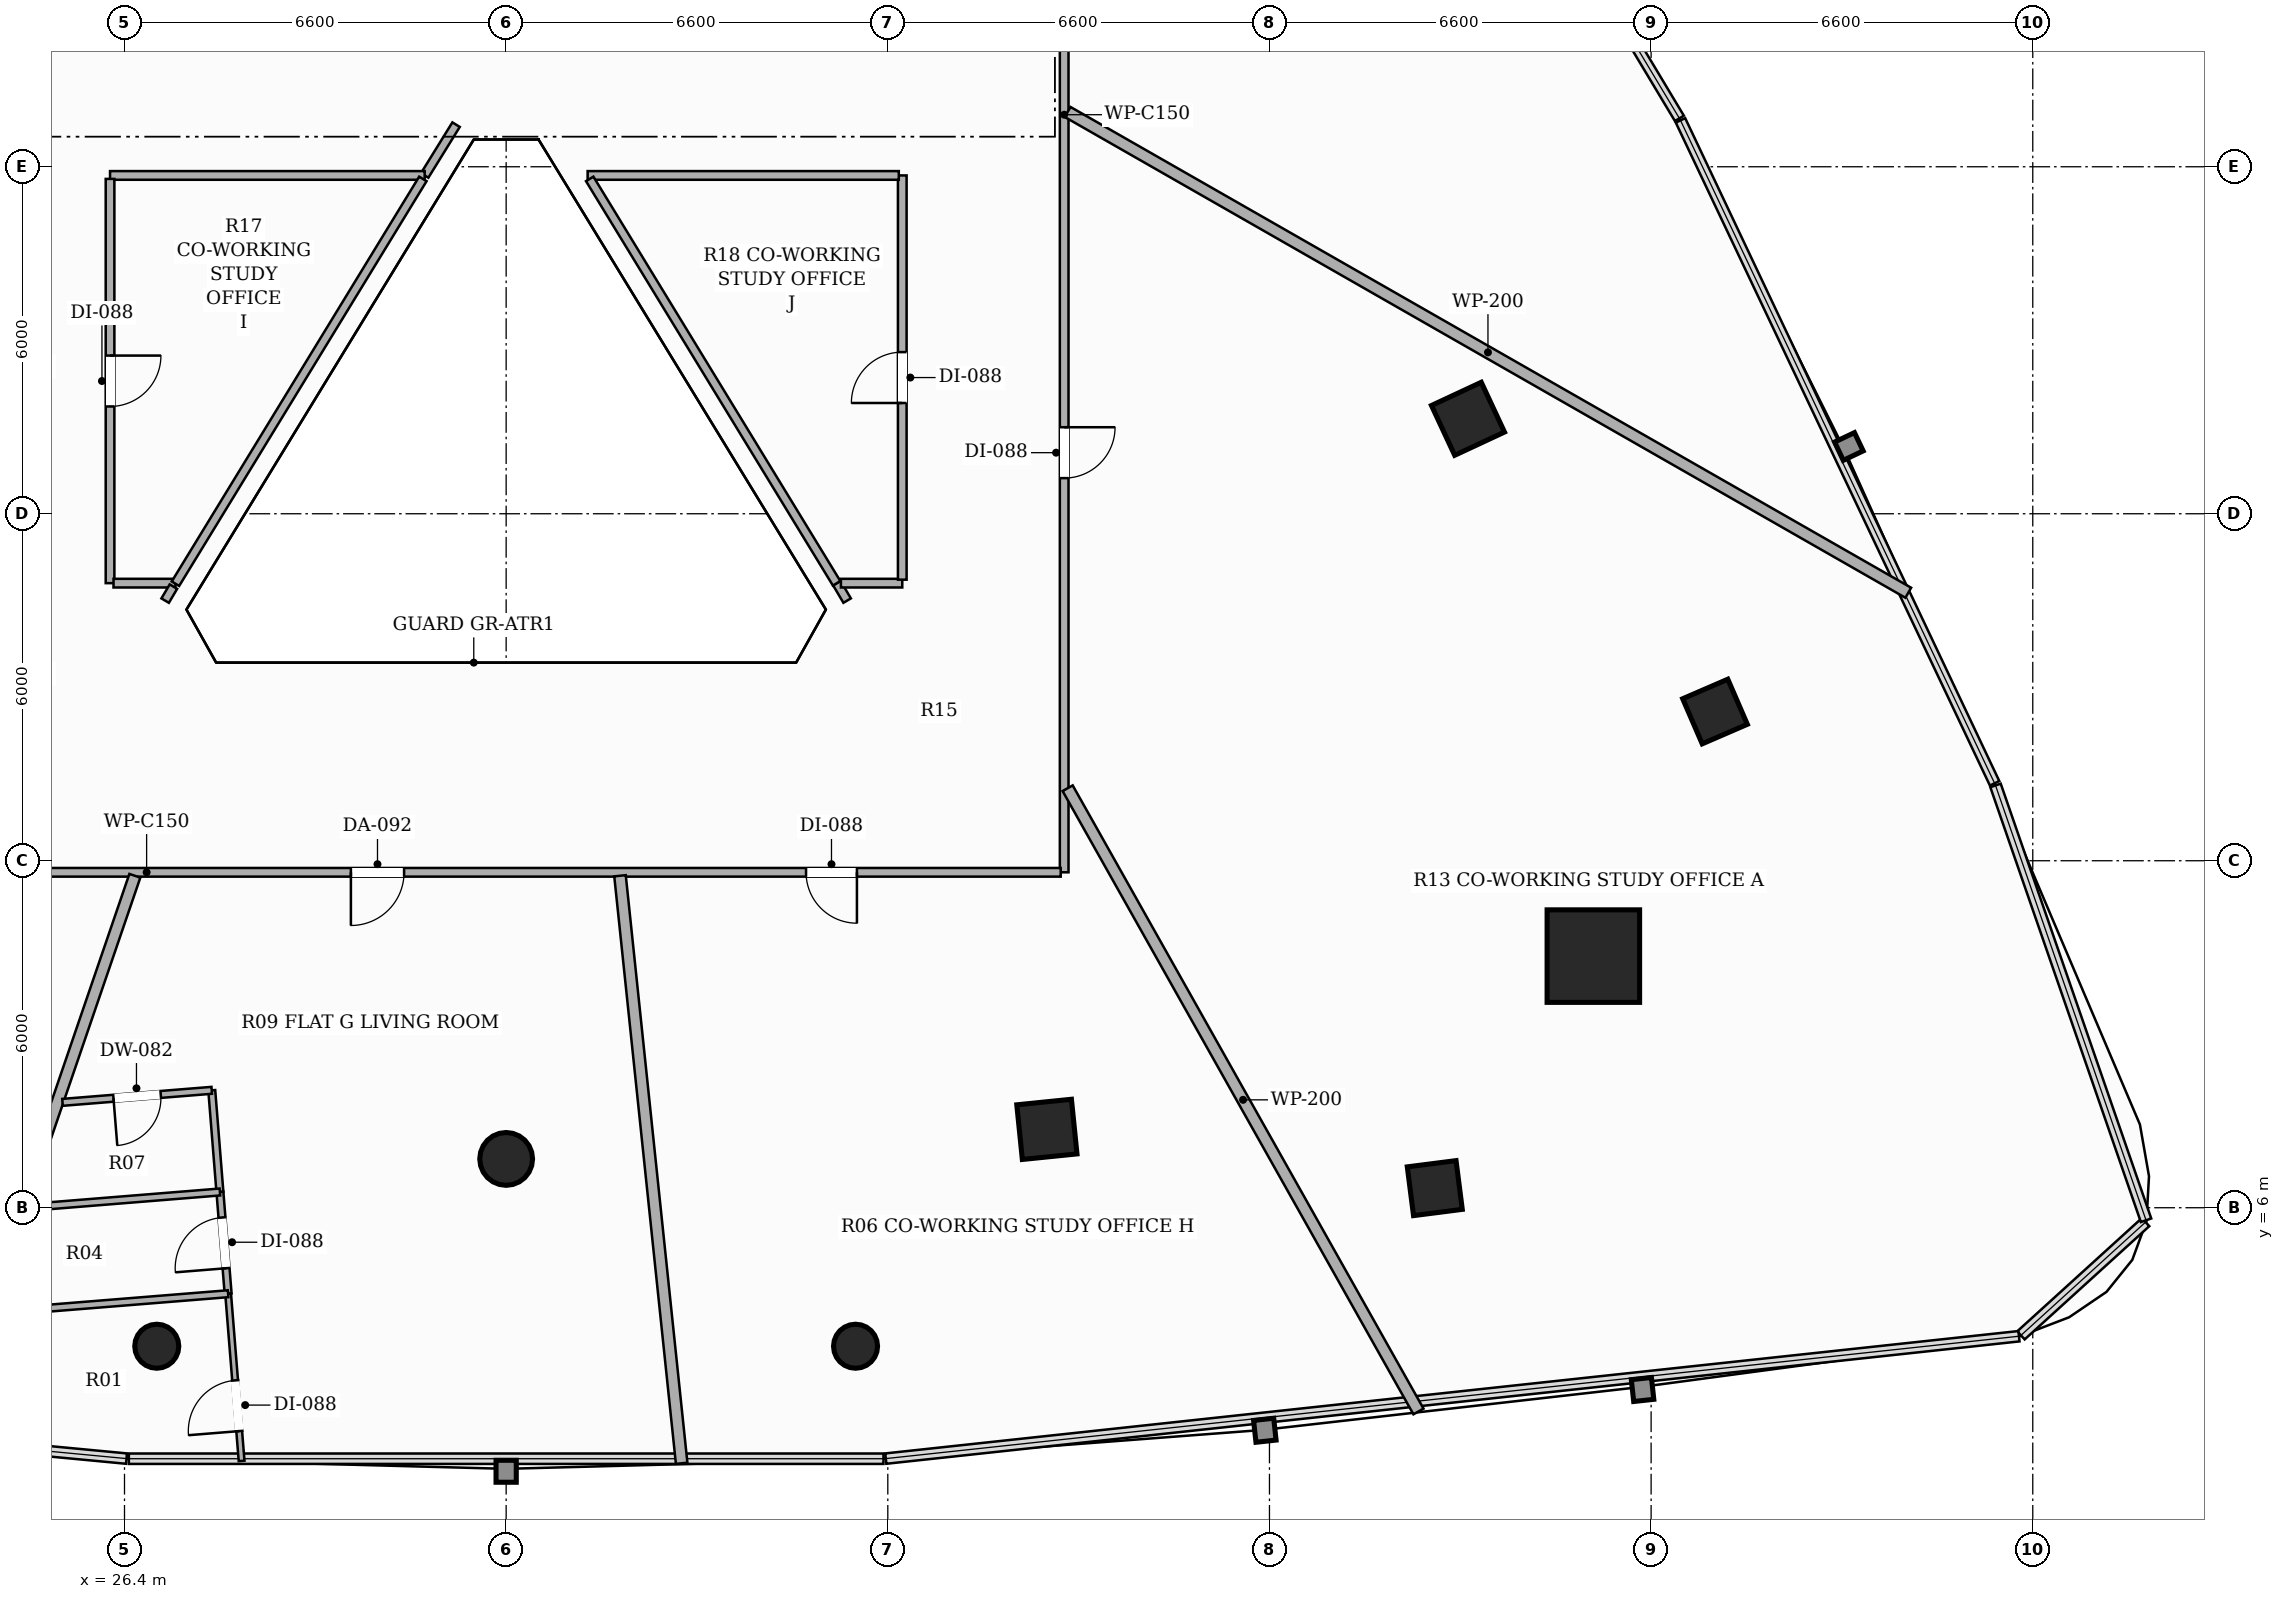
"""IFC4 building model, lengths in metres.
Left out: names, types, materials, properties, quantities, classifications, styles, units other than length and angle.
Written with IfcOpenShell. Run it as: python <this file> out.ifc"""

import sys

from ifc_helpers import new_model, si_unit, direction, frame, frame_2d, origin, origin_2d, place, context, subcontext, project, spatial, rectangle, hollow_rectangle, hollow_circle, extrude, element, fill, save


model = new_model("IFC4")
c1 = context("Model", 3, precision=1e-05, world=origin(), true_north=direction((0.0, 1.0)))
c2 = subcontext(c1, "Body", "Model", "MODEL_VIEW")
j1 = project(units=[si_unit("LENGTHUNIT", "METRE"), si_unit("PLANEANGLEUNIT", "RADIAN")], contexts=[c1])
p1 = place(None, origin())
s1 = spatial("IfcSite", under=j1, at=p1, CompositionType="ELEMENT")
p2 = place(p1, origin())
s2 = spatial("IfcBuilding", under=s1, at=p2, CompositionType="ELEMENT")
p3 = place(p2, frame((0.0, 0.0, 56.6)))
s3 = spatial("IfcBuildingStorey", under=s2, at=p3, CompositionType="ELEMENT", Elevation=56.6)
p4 = place(p3, frame((51.801, 10.351, 0.0), z_axis=(0.0, 0.0, 1.0), x_axis=(1.0, 0.0, 0.0)))
e1 = element("IfcColumn", 1, at=p4, inside=s3, PredefinedType="COLUMN", context=c2, shape_type="SweptSolid", body=[
    extrude(hollow_rectangle(XDim=1.6, YDim=1.6, WallThickness=0.05, at=origin_2d()), origin(), (0.0, 0.0, 1.0), 3.3),
])
p5 = place(p3, frame((33.0, 6.844, 0.0), z_axis=(0.0, 0.0, 1.0), x_axis=(1.0, 0.0, 0.0)))
e2 = element("IfcColumn", 2, at=p5, inside=s3, PredefinedType="COLUMN", context=c2, shape_type="SweptSolid", body=[
    extrude(hollow_circle(Radius=0.457, WallThickness=0.025, at=origin_2d()), origin(), (0.0, 0.0, 1.0), 3.3),
])
for number, where, z_axis, x_axis in (
    (3, (42.351, 7.355, 0.0), (0.0, 0.0, 1.0), (0.995, 0.101, 0.0)),
    (4, (49.633, 19.642, 0.0), (0.0, 0.0, 1.0), (-0.423, 0.906, 0.0)),
):
    element("IfcColumn", number, at=place(p3, frame(where, z_axis=z_axis, x_axis=x_axis)), inside=s3, PredefinedType="COLUMN", context=c2, shape_type="SweptSolid", body=[
        extrude(hollow_rectangle(XDim=0.95, YDim=0.95, WallThickness=0.032, at=origin_2d()), origin(), (0.0, 0.0, 1.0), 3.3),
    ])
for number, where, z_axis, x_axis in (
    (5, (49.059, 6.339, 0.0), (0.0, 0.0, 1.0), (0.992, 0.127, 0.0)),
    (6, (53.905, 14.58, 0.0), (0.0, 0.0, 1.0), (-0.397, 0.918, 0.0)),
):
    element("IfcColumn", number, at=place(p3, frame(where, z_axis=z_axis, x_axis=x_axis)), inside=s3, PredefinedType="COLUMN", context=c2, shape_type="SweptSolid", body=[
        extrude(hollow_rectangle(XDim=0.85, YDim=0.85, WallThickness=0.028, at=origin_2d()), origin(), (0.0, 0.0, 1.0), 3.3),
    ])
for number, where, z_axis, x_axis in (
    (7, (26.958, 3.605, 0.0), (0.0, 0.0, 1.0), (1.0, 0.0, 0.0)),
    (8, (39.042, 3.605, 0.0), (0.0, 0.0, 1.0), (1.0, 0.0, 0.0)),
):
    element("IfcColumn", number, at=place(p3, frame(where, z_axis=z_axis, x_axis=x_axis)), inside=s3, PredefinedType="COLUMN", context=c2, shape_type="SweptSolid", body=[
        extrude(hollow_circle(Radius=0.381, WallThickness=0.022, at=origin_2d()), origin(), (0.0, 0.0, 1.0), 3.3),
    ])
p6 = place(p3, frame((42.65, 36.84, 0.0), z_axis=(0.0, 0.0, 1.0), x_axis=(0.0, -1.0, 0.0)))
e9 = element("IfcWall", 9, at=p6, inside=s3, PredefinedType="PARTITIONING", context=c2, shape_type="SweptSolid", body=[
    extrude(rectangle(XDim=25.04, YDim=0.15, at=frame_2d((12.52, 0.0))), origin(), (0.0, 0.0, 1.0), 2.373),
])
p7 = place(p6, frame((17.344, 0.0, 0.0)))
e10 = element("IfcOpeningElement", 10, at=p7, cuts=e9, PredefinedType="OPENING", context=c2, shape_type="SweptSolid", body=[
    extrude(rectangle(XDim=0.88, YDim=2.1, at=frame_2d((0.44, 1.05))), frame((0.0, 0.085, 0.0), z_axis=(0.0, -1.0, 0.0), x_axis=(1.0, 0.0, 0.0)), (0.0, 0.0, 1.0), 0.17),
])
p8 = place(p6, frame((5.656, 0.0, 0.0)))
e11 = element("IfcOpeningElement", 11, at=p8, cuts=e9, PredefinedType="OPENING", context=c2, shape_type="SweptSolid", body=[
    extrude(rectangle(XDim=0.88, YDim=2.1, at=frame_2d((0.44, 1.05))), frame((0.0, 0.085, 0.0), z_axis=(0.0, -1.0, 0.0), x_axis=(1.0, 0.0, 0.0)), (0.0, 0.0, 1.0), 0.17),
])
p9 = place(p3, frame((42.59, 11.8, 0.0), z_axis=(0.0, 0.0, 1.0), x_axis=(-1.0, 0.0, 0.0)))
e12 = element("IfcWall", 12, at=p9, inside=s3, PredefinedType="PARTITIONING", context=c2, shape_type="SweptSolid", body=[
    extrude(rectangle(XDim=19.24, YDim=0.15, at=frame_2d((9.62, 0.0))), origin(), (0.0, 0.0, 1.0), 2.629),
])
p10 = place(p9, frame((11.355, 0.0, 0.0)))
e13 = element("IfcOpeningElement", 13, at=p10, cuts=e12, PredefinedType="OPENING", context=c2, shape_type="SweptSolid", body=[
    extrude(rectangle(XDim=0.92, YDim=2.15, at=frame_2d((0.46, 1.075))), frame((0.0, 0.085, 0.0), z_axis=(0.0, -1.0, 0.0), x_axis=(1.0, 0.0, 0.0)), (0.0, 0.0, 1.0), 0.17),
])
p11 = place(p9, frame((3.524, 0.0, 0.0)))
e14 = element("IfcOpeningElement", 14, at=p11, cuts=e12, PredefinedType="OPENING", context=c2, shape_type="SweptSolid", body=[
    extrude(rectangle(XDim=0.88, YDim=2.1, at=frame_2d((0.44, 1.05))), frame((0.0, 0.085, 0.0), z_axis=(0.0, -1.0, 0.0), x_axis=(1.0, 0.0, 0.0)), (0.0, 0.0, 1.0), 0.17),
])
p12 = place(p3, frame((32.134, 24.728, 0.0), z_axis=(0.0, 0.0, 1.0), x_axis=(-0.525996314714, -0.850486846993, 0.0)))
e15 = element("IfcWall", 15, at=p12, inside=s3, PredefinedType="PARTITIONING", context=c2, shape_type="SweptSolid", body=[
    extrude(rectangle(XDim=1.032, YDim=0.15, at=frame_2d((0.516, 0.0))), origin(), (0.0, 0.0, 1.0), 3.02),
])
p13 = place(p3, frame((31.591, 23.85, 0.0), z_axis=(0.0, 0.0, 1.0), x_axis=(-1.0, 0.0, 0.0)))
e16 = element("IfcWall", 16, at=p13, inside=s3, PredefinedType="PARTITIONING", context=c2, shape_type="SweptSolid", body=[
    extrude(rectangle(XDim=5.441, YDim=0.15, at=frame_2d((2.721, 0.0))), origin(), (0.0, 0.0, 1.0), 2.629),
])
p14 = place(p3, frame((26.15, 23.79, 0.0), z_axis=(0.0, 0.0, 1.0), x_axis=(0.0, -1.0, 0.0)))
e17 = element("IfcWall", 17, at=p14, inside=s3, PredefinedType="PARTITIONING", context=c2, shape_type="SweptSolid", body=[
    extrude(rectangle(XDim=6.99, YDim=0.15, at=frame_2d((3.495, 0.0))), origin(), (0.0, 0.0, 1.0), 2.629),
])
p15 = place(p14, frame((3.055, 0.0, 0.0)))
e18 = element("IfcOpeningElement", 18, at=p15, cuts=e17, PredefinedType="OPENING", context=c2, shape_type="SweptSolid", body=[
    extrude(rectangle(XDim=0.88, YDim=2.1, at=frame_2d((0.44, 1.05))), frame((0.0, 0.085, 0.0), z_axis=(0.0, -1.0, 0.0), x_axis=(1.0, 0.0, 0.0)), (0.0, 0.0, 1.0), 0.17),
])
p16 = place(p3, frame((26.21, 16.8, 0.0), z_axis=(0.0, 0.0, 1.0), x_axis=(1.0, 0.0, 0.0)))
e19 = element("IfcWall", 19, at=p16, inside=s3, PredefinedType="PARTITIONING", context=c2, shape_type="SweptSolid", body=[
    extrude(rectangle(XDim=1.071, YDim=0.15, at=frame_2d((0.536, 0.0))), origin(), (0.0, 0.0, 1.0), 3.02),
])
p17 = place(p3, frame((27.246, 16.74, 0.0), z_axis=(0.0, 0.0, 1.0), x_axis=(-0.508992658084, -0.860770860344, 0.0)))
e20 = element("IfcWall", 20, at=p17, inside=s3, PredefinedType="PARTITIONING", context=c2, shape_type="SweptSolid", body=[
    extrude(rectangle(XDim=0.281, YDim=0.15, at=frame_2d((0.141, 0.0))), origin(), (0.0, 0.0, 1.0), 3.02),
])
p18 = place(p3, frame((38.897, 16.498, 0.0), z_axis=(0.0, 0.0, 1.0), x_axis=(-0.507720001023, 0.861522141654, 0.0)))
e21 = element("IfcWall", 21, at=p18, inside=s3, PredefinedType="PARTITIONING", context=c2, shape_type="SweptSolid", body=[
    extrude(rectangle(XDim=0.351, YDim=0.15, at=frame_2d((0.175, 0.0))), origin(), (0.0, 0.0, 1.0), 3.02),
])
p19 = place(p3, frame((38.789, 16.8, 0.0), z_axis=(0.0, 0.0, 1.0), x_axis=(1.0, 0.0, 0.0)))
e22 = element("IfcWall", 22, at=p19, inside=s3, PredefinedType="PARTITIONING", context=c2, shape_type="SweptSolid", body=[
    extrude(rectangle(XDim=1.061, YDim=0.15, at=frame_2d((0.531, 0.0))), origin(), (0.0, 0.0, 1.0), 3.02),
])
p20 = place(p3, frame((39.85, 16.86, 0.0), z_axis=(0.0, 0.0, 1.0), x_axis=(0.0, 1.0, 0.0)))
e23 = element("IfcWall", 23, at=p20, inside=s3, PredefinedType="PARTITIONING", context=c2, shape_type="SweptSolid", body=[
    extrude(rectangle(XDim=6.99, YDim=0.15, at=frame_2d((3.495, 0.0))), origin(), (0.0, 0.0, 1.0), 2.629),
])
p21 = place(p20, frame((3.055, 0.0, 0.0)))
e24 = element("IfcOpeningElement", 24, at=p21, cuts=e23, PredefinedType="OPENING", context=c2, shape_type="SweptSolid", body=[
    extrude(rectangle(XDim=0.88, YDim=2.1, at=frame_2d((0.44, 1.05))), frame((0.0, 0.085, 0.0), z_axis=(0.0, -1.0, 0.0), x_axis=(1.0, 0.0, 0.0)), (0.0, 0.0, 1.0), 0.17),
])
p22 = place(p3, frame((39.79, 23.85, 0.0), z_axis=(0.0, 0.0, 1.0), x_axis=(-1.0, 0.0, 0.0)))
e25 = element("IfcWall", 25, at=p22, inside=s3, PredefinedType="PARTITIONING", context=c2, shape_type="SweptSolid", body=[
    extrude(rectangle(XDim=5.381, YDim=0.15, at=frame_2d((2.69, 0.0))), origin(), (0.0, 0.0, 1.0), 2.629),
])
p23 = place(p3, frame((27.281, 16.79, 0.0), z_axis=(0.0, 0.0, 1.0), x_axis=(0.521563150989, 0.8532126813, 0.0)))
e26 = element("IfcWall", 26, at=p23, inside=s3, PredefinedType="PARTITIONING", context=c2, shape_type="SweptSolid", body=[
    extrude(rectangle(XDim=8.204, YDim=0.15, at=frame_2d((4.102, 0.0))), origin(), (0.0, 0.0, 1.0), 2.629),
])
p24 = place(p3, frame((34.445, 23.79, 0.0), z_axis=(0.0, 0.0, 1.0), x_axis=(0.521145044988, -0.853468125992, 0.0)))
e27 = element("IfcWall", 27, at=p24, inside=s3, PredefinedType="PARTITIONING", context=c2, shape_type="SweptSolid", body=[
    extrude(rectangle(XDim=8.194, YDim=0.15, at=frame_2d((4.097, 0.0))), origin(), (0.0, 0.0, 1.0), 2.629),
])
p25 = place(p3, frame((42.71, 24.947, 0.0), z_axis=(0.0, 0.0, 1.0), x_axis=(0.868086992596, -0.49641210026, 0.0)))
e28 = element("IfcWall", 28, at=p25, inside=s3, PredefinedType="PARTITIONING", context=c2, shape_type="SweptSolid", body=[
    extrude(rectangle(XDim=16.746, YDim=0.2, at=frame_2d((8.373, 0.0))), origin(), (0.0, 0.0, 1.0), 2.373),
])
p26 = place(p3, frame((48.777, 2.477, 0.0), z_axis=(0.0, 0.0, 1.0), x_axis=(-0.490577996894, 0.871397285377, 0.0)))
e29 = element("IfcWall", 29, at=p26, inside=s3, PredefinedType="PARTITIONING", context=c2, shape_type="SweptSolid", body=[
    extrude(rectangle(XDim=12.367, YDim=0.2, at=frame_2d((6.184, 0.0))), origin(), (0.0, 0.0, 1.0), 2.373),
])
p27 = place(p3, frame((26.579, 11.74, 0.0), z_axis=(0.0, 0.0, 1.0), x_axis=(-0.32385337678, -0.946107282684, 0.0)))
e30 = element("IfcWall", 30, at=p27, inside=s3, PredefinedType="PARTITIONING", context=c2, shape_type="SweptSolid", body=[
    extrude(rectangle(XDim=10.378, YDim=0.2, at=frame_2d((5.189, 0.0))), origin(), (0.0, 0.0, 1.0), 2.373),
])
p28 = place(p3, frame((34.969, 11.74, 0.0), z_axis=(0.0, 0.0, 1.0), x_axis=(0.10435134466, -0.994540495338, 0.0)))
e31 = element("IfcWall", 31, at=p28, inside=s3, PredefinedType="PARTITIONING", context=c2, shape_type="SweptSolid", body=[
    extrude(rectangle(XDim=10.215, YDim=0.2, at=frame_2d((5.107, 0.0))), origin(), (0.0, 0.0, 1.0), 2.373),
])
p29 = place(p3, frame((28.05, 6.272, 0.0), z_axis=(0.0, 0.0, 1.0), x_axis=(-0.080009304194, 0.996794116778, 0.0)))
e32 = element("IfcWall", 32, at=p29, inside=s3, PredefinedType="PARTITIONING", context=c2, shape_type="SweptSolid", body=[
    extrude(rectangle(XDim=1.764, YDim=0.12, at=frame_2d((0.882, 0.0))), origin(), (0.0, 0.0, 1.0), 3.02),
])
p30 = place(p3, frame((27.909, 8.03, 0.0), z_axis=(0.0, 0.0, 1.0), x_axis=(-0.996768339954, -0.080329798112, 0.0)))
e33 = element("IfcWall", 33, at=p30, inside=s3, PredefinedType="PARTITIONING", context=c2, shape_type="SweptSolid", body=[
    extrude(rectangle(XDim=2.589, YDim=0.12, at=frame_2d((1.295, 0.0))), origin(), (0.0, 0.0, 1.0), 3.02),
])
p31 = place(p30, frame((0.885, 0.0, 0.0)))
e34 = element("IfcOpeningElement", 34, at=p31, cuts=e33, PredefinedType="OPENING", context=c2, shape_type="SweptSolid", body=[
    extrude(rectangle(XDim=0.82, YDim=2.1, at=frame_2d((0.41, 1.05))), frame((0.0, 0.07, 0.0), z_axis=(0.0, -1.0, 0.0), x_axis=(1.0, 0.0, 0.0)), (0.0, 0.0, 1.0), 0.14),
])
p32 = place(p3, frame((28.192, 4.513, 0.0), z_axis=(0.0, 0.0, 1.0), x_axis=(-0.080377539135, 0.996764491343, 0.0)))
e35 = element("IfcWall", 35, at=p32, inside=s3, PredefinedType="PARTITIONING", context=c2, shape_type="SweptSolid", body=[
    extrude(rectangle(XDim=1.765, YDim=0.12, at=frame_2d((0.882, 0.0))), origin(), (0.0, 0.0, 1.0), 2.373),
])
p33 = place(p32, frame((0.442, 0.0, 0.0)))
e36 = element("IfcOpeningElement", 36, at=p33, cuts=e35, PredefinedType="OPENING", context=c2, shape_type="SweptSolid", body=[
    extrude(rectangle(XDim=0.88, YDim=2.1, at=frame_2d((0.44, 1.05))), frame((0.0, 0.07, 0.0), z_axis=(0.0, -1.0, 0.0), x_axis=(1.0, 0.0, 0.0)), (0.0, 0.0, 1.0), 0.14),
])
p34 = place(p3, frame((28.425, 1.622, 0.0), z_axis=(0.0, 0.0, 1.0), x_axis=(-0.080390934681, 0.996763411057, 0.0)))
e37 = element("IfcWall", 37, at=p34, inside=s3, PredefinedType="PARTITIONING", context=c2, shape_type="SweptSolid", body=[
    extrude(rectangle(XDim=2.9, YDim=0.1, at=frame_2d((1.45, 0.0))), origin(), (0.0, 0.0, 1.0), 2.373),
])
p35 = place(p34, frame((0.517, 0.0, 0.0)))
e38 = element("IfcOpeningElement", 38, at=p35, cuts=e37, PredefinedType="OPENING", context=c2, shape_type="SweptSolid", body=[
    extrude(rectangle(XDim=0.88, YDim=2.1, at=frame_2d((0.44, 1.05))), frame((0.0, 0.06, 0.0), z_axis=(0.0, -1.0, 0.0), x_axis=(1.0, 0.0, 0.0)), (0.0, 0.0, 1.0), 0.12),
])
p36 = place(p3, frame((28.05, 6.272, 0.0), z_axis=(0.0, 0.0, 1.0), x_axis=(-0.99675765278, -0.080462299392, 0.0)))
e39 = element("IfcWall", 39, at=p36, inside=s3, PredefinedType="PARTITIONING", context=c2, shape_type="SweptSolid", body=[
    extrude(rectangle(XDim=3.356, YDim=0.12, at=frame_2d((1.678, 0.0))), origin(), (0.0, 0.0, 1.0), 2.373),
])
p37 = place(p3, frame((28.192, 4.513, 0.0), z_axis=(0.0, 0.0, 1.0), x_axis=(-0.996771449714, -0.080291201486, 0.0)))
e40 = element("IfcWall", 40, at=p37, inside=s3, PredefinedType="PARTITIONING", context=c2, shape_type="SweptSolid", body=[
    extrude(rectangle(XDim=4.123, YDim=0.12, at=frame_2d((2.062, 0.0))), origin(), (0.0, 0.0, 1.0), 2.373),
])
p38 = place(p7, origin())
e41 = element("IfcDoor", 41, at=p38, inside=s3, OperationType="SINGLE_SWING_LEFT", PredefinedType="DOOR", context=c2, shape_type="SweptSolid", body=[
    extrude(rectangle(XDim=0.88, YDim=2.1, at=frame_2d((0.44, 1.05))), frame((0.0, 0.025, 0.0), z_axis=(0.0, -1.0, 0.0), x_axis=(1.0, 0.0, 0.0)), (0.0, 0.0, 1.0), 0.05),
])
fill(e10, e41)
p39 = place(p10, origin())
e42 = element("IfcDoor", 42, at=p39, inside=s3, OperationType="SINGLE_SWING_RIGHT", PredefinedType="DOOR", context=c2, shape_type="SweptSolid", body=[
    extrude(rectangle(XDim=0.92, YDim=2.15, at=frame_2d((0.46, 1.075))), frame((0.0, 0.025, 0.0), z_axis=(0.0, -1.0, 0.0), x_axis=(1.0, 0.0, 0.0)), (0.0, 0.0, 1.0), 0.05),
])
fill(e13, e42)
p40 = place(p31, origin())
e43 = element("IfcDoor", 43, at=p40, inside=s3, OperationType="SINGLE_SWING_RIGHT", PredefinedType="DOOR", context=c2, shape_type="SweptSolid", body=[
    extrude(rectangle(XDim=0.82, YDim=2.1, at=frame_2d((0.41, 1.05))), frame((0.0, 0.025, 0.0), z_axis=(0.0, -1.0, 0.0), x_axis=(1.0, 0.0, 0.0)), (0.0, 0.0, 1.0), 0.05),
])
fill(e34, e43)
p41 = place(p33, origin())
e44 = element("IfcDoor", 44, at=p41, inside=s3, OperationType="SINGLE_SWING_LEFT", PredefinedType="DOOR", context=c2, shape_type="SweptSolid", body=[
    extrude(rectangle(XDim=0.88, YDim=2.1, at=frame_2d((0.44, 1.05))), frame((0.0, 0.025, 0.0), z_axis=(0.0, -1.0, 0.0), x_axis=(1.0, 0.0, 0.0)), (0.0, 0.0, 1.0), 0.05),
])
fill(e36, e44)
p42 = place(p35, origin())
e45 = element("IfcDoor", 45, at=p42, inside=s3, OperationType="SINGLE_SWING_LEFT", PredefinedType="DOOR", context=c2, shape_type="SweptSolid", body=[
    extrude(rectangle(XDim=0.88, YDim=2.1, at=frame_2d((0.44, 1.05))), frame((0.0, 0.025, 0.0), z_axis=(0.0, -1.0, 0.0), x_axis=(1.0, 0.0, 0.0)), (0.0, 0.0, 1.0), 0.05),
])
fill(e38, e45)
p43 = place(p11, origin())
e46 = element("IfcDoor", 46, at=p43, inside=s3, OperationType="SINGLE_SWING_LEFT", PredefinedType="DOOR", context=c2, shape_type="SweptSolid", body=[
    extrude(rectangle(XDim=0.88, YDim=2.1, at=frame_2d((0.44, 1.05))), frame((0.0, 0.025, 0.0), z_axis=(0.0, -1.0, 0.0), x_axis=(1.0, 0.0, 0.0)), (0.0, 0.0, 1.0), 0.05),
])
fill(e14, e46)
p44 = place(p15, origin())
e47 = element("IfcDoor", 47, at=p44, inside=s3, OperationType="SINGLE_SWING_LEFT", PredefinedType="DOOR", context=c2, shape_type="SweptSolid", body=[
    extrude(rectangle(XDim=0.88, YDim=2.1, at=frame_2d((0.44, 1.05))), frame((0.0, 0.025, 0.0), z_axis=(0.0, -1.0, 0.0), x_axis=(1.0, 0.0, 0.0)), (0.0, 0.0, 1.0), 0.05),
])
fill(e18, e47)
p45 = place(p21, origin())
e48 = element("IfcDoor", 48, at=p45, inside=s3, OperationType="SINGLE_SWING_LEFT", PredefinedType="DOOR", context=c2, shape_type="SweptSolid", body=[
    extrude(rectangle(XDim=0.88, YDim=2.1, at=frame_2d((0.44, 1.05))), frame((0.0, 0.025, 0.0), z_axis=(0.0, -1.0, 0.0), x_axis=(1.0, 0.0, 0.0)), (0.0, 0.0, 1.0), 0.05),
])
fill(e24, e48)
save(model, sys.argv[1])
